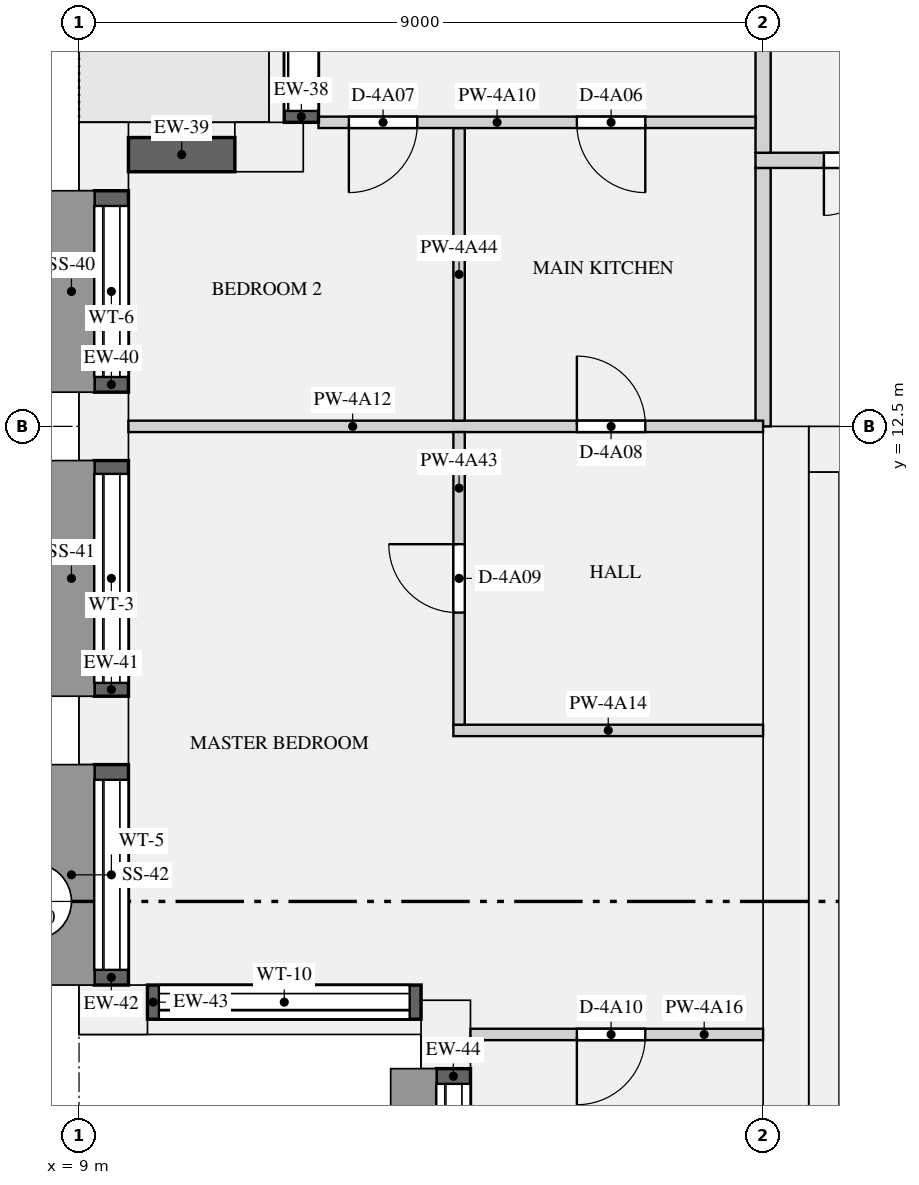
"""IFC4 building model, lengths in metres.
Left out: names, types, materials, properties, quantities, classifications, styles, units other than length and angle.
Written with IfcOpenShell. Run it as: python <this file> out.ifc"""

import sys

from ifc_helpers import new_model, si_unit, direction, frame, frame_2d, origin, origin_2d, place, context, subcontext, project, spatial, rectangle, extrude, element, fill, save


model = new_model("IFC4")
c1 = context("Model", 3, precision=1e-05, world=origin(), true_north=direction((0.0, 1.0)))
c2 = subcontext(c1, "Body", "Model", "MODEL_VIEW")
j1 = project(units=[si_unit("LENGTHUNIT", "METRE"), si_unit("PLANEANGLEUNIT", "RADIAN")], contexts=[c1])
p1 = place(None, origin())
s1 = spatial("IfcSite", under=j1, at=p1, CompositionType="ELEMENT")
p2 = place(p1, origin())
s2 = spatial("IfcBuilding", under=s1, at=p2, CompositionType="ELEMENT")
p3 = place(p2, frame((0.0, 0.0, 198.0)))
s3 = spatial("IfcBuildingStorey", under=s2, at=p3, CompositionType="ELEMENT", Elevation=198.0)
for number, where, z_axis, x_axis in (
    (1, (11.5, 16.175, 0.0), (0.0, 0.0, 1.0), (-1.0, 0.0, 0.0)),
    (2, (9.325, 16.05, 0.0), (0.0, 0.0, 1.0), (0.0, -1.0, 0.0)),
    (3, (9.325, 12.5, 0.0), (0.0, 0.0, 1.0), (0.0, -1.0, 0.0)),
    (4, (9.325, 8.5, 0.0), (0.0, 0.0, 1.0), (0.0, -1.0, 0.0)),
    (5, (9.45, 4.825, 0.0), (0.0, 0.0, 1.0), (1.0, 0.0, 0.0)),
    (6, (13.825, 4.5, 0.0), (0.0, 0.0, 1.0), (0.0, -1.0, 0.0)),
):
    element("IfcColumn", number, at=place(p3, frame(where, z_axis=z_axis, x_axis=x_axis)), inside=s3, PredefinedType="USERDEFINED", context=c2, shape_type="SweptSolid", body=[
        extrude(rectangle(XDim=0.9, YDim=0.65, at=origin_2d()), origin(), (0.0, 0.0, 1.0), 3.15),
    ])
p4 = place(p3, frame((18.3, 0.0, 0.0), z_axis=(0.0, 0.0, 1.0), x_axis=(0.0, 1.0, 0.0)))
e7 = element("IfcWall", 7, at=p4, inside=s3, PredefinedType="SHEAR", context=c2, shape_type="SweptSolid", body=[
    extrude(rectangle(XDim=12.5, YDim=0.6, at=frame_2d((6.25, 0.0))), origin(), (0.0, 0.0, 1.0), 3.15),
])
p5 = place(p3, frame((18.6, 12.2, 0.0), z_axis=(0.0, 0.0, 1.0), x_axis=(1.0, 0.0, 0.0)))
e8 = element("IfcWall", 8, at=p5, inside=s3, PredefinedType="SHEAR", context=c2, shape_type="SweptSolid", body=[
    extrude(rectangle(XDim=34.8, YDim=0.6, at=frame_2d((17.4, 0.0))), origin(), (0.0, 0.0, 1.0), 3.15),
])
p6 = place(p5, frame((24.575, 0.0, 0.0)))
e9 = element("IfcOpeningElement", 9, at=p6, cuts=e8, PredefinedType="OPENING", context=c2, shape_type="SweptSolid", body=[
    extrude(rectangle(XDim=1.1, YDim=2.1, at=frame_2d((0.55, 1.05))), frame((0.0, 0.31, 0.0), z_axis=(0.0, -1.0, 0.0), x_axis=(1.0, 0.0, 0.0)), (0.0, 0.0, 1.0), 0.62),
])
p7 = place(p5, frame((26.825, 0.0, 0.0)))
e10 = element("IfcOpeningElement", 10, at=p7, cuts=e8, PredefinedType="OPENING", context=c2, shape_type="SweptSolid", body=[
    extrude(rectangle(XDim=1.1, YDim=2.1, at=frame_2d((0.55, 1.05))), frame((0.0, 0.31, 0.0), z_axis=(0.0, -1.0, 0.0), x_axis=(1.0, 0.0, 0.0)), (0.0, 0.0, 1.0), 0.62),
])
p8 = place(p5, frame((29.075, 0.0, 0.0)))
e11 = element("IfcOpeningElement", 11, at=p8, cuts=e8, PredefinedType="OPENING", context=c2, shape_type="SweptSolid", body=[
    extrude(rectangle(XDim=1.1, YDim=2.1, at=frame_2d((0.55, 1.05))), frame((0.0, 0.31, 0.0), z_axis=(0.0, -1.0, 0.0), x_axis=(1.0, 0.0, 0.0)), (0.0, 0.0, 1.0), 0.62),
])
p9 = place(p5, frame((4.95, 0.0, 0.0)))
e12 = element("IfcOpeningElement", 12, at=p9, cuts=e8, PredefinedType="OPENING", context=c2, shape_type="SweptSolid", body=[
    extrude(rectangle(XDim=0.9, YDim=2.1, at=frame_2d((0.45, 1.05))), frame((0.0, 0.31, 0.0), z_axis=(0.0, -1.0, 0.0), x_axis=(1.0, 0.0, 0.0)), (0.0, 0.0, 1.0), 0.62),
])
p10 = place(p5, frame((18.45, 0.0, 0.0)))
e13 = element("IfcOpeningElement", 13, at=p10, cuts=e8, PredefinedType="OPENING", context=c2, shape_type="SweptSolid", body=[
    extrude(rectangle(XDim=0.9, YDim=2.1, at=frame_2d((0.45, 1.05))), frame((0.0, 0.31, 0.0), z_axis=(0.0, -1.0, 0.0), x_axis=(1.0, 0.0, 0.0)), (0.0, 0.0, 1.0), 0.62),
])
p11 = place(p5, frame((1.55, 0.0, 0.0)))
e14 = element("IfcOpeningElement", 14, at=p11, cuts=e8, PredefinedType="OPENING", context=c2, shape_type="SweptSolid", body=[
    extrude(rectangle(XDim=1.2, YDim=2.1, at=frame_2d((0.6, 1.05))), frame((0.0, 0.31, 0.0), z_axis=(0.0, -1.0, 0.0), x_axis=(1.0, 0.0, 0.0)), (0.0, 0.0, 1.0), 0.62),
])
p12 = place(p5, frame((32.05, 0.0, 0.0)))
e15 = element("IfcOpeningElement", 15, at=p12, cuts=e8, PredefinedType="OPENING", context=c2, shape_type="SweptSolid", body=[
    extrude(rectangle(XDim=1.2, YDim=2.1, at=frame_2d((0.6, 1.05))), frame((0.0, 0.31, 0.0), z_axis=(0.0, -1.0, 0.0), x_axis=(1.0, 0.0, 0.0)), (0.0, 0.0, 1.0), 0.62),
])
p13 = place(p3, frame((18.8, 1.0, 0.0), z_axis=(0.0, 0.0, 1.0), x_axis=(0.0, 1.0, 0.0)))
e16 = element("IfcWall", 16, at=p13, inside=s3, PredefinedType="SHEAR", context=c2, shape_type="SweptSolid", body=[
    extrude(rectangle(XDim=10.9, YDim=0.4, at=frame_2d((5.45, 0.0))), origin(), (0.0, 0.0, 1.0), 3.15),
])
p14 = place(p3, frame((11.925, 20.05, 0.0), z_axis=(0.0, 0.0, 1.0), x_axis=(0.0, -1.0, 0.0)))
e17 = element("IfcWall", 17, at=p14, inside=s3, PredefinedType="SOLIDWALL", context=c2, shape_type="SweptSolid", body=[
    extrude(rectangle(XDim=3.55, YDim=0.45, at=frame_2d((1.775, 0.0))), origin(), (0.0, 0.0, 1.0), 2.83),
])
p15 = place(p14, frame((0.15, 0.0, 0.0)))
e18 = element("IfcOpeningElement", 18, at=p15, cuts=e17, PredefinedType="OPENING", context=c2, shape_type="SweptSolid", body=[
    extrude(rectangle(XDim=3.25, YDim=2.3, at=frame_2d((1.625, 1.15))), frame((0.0, 0.235, 0.0), z_axis=(0.0, -1.0, 0.0), x_axis=(1.0, 0.0, 0.0)), (0.0, 0.0, 1.0), 0.47),
])
p16 = place(p3, frame((11.05, 16.075, 0.9), z_axis=(0.0, 0.0, 1.0), x_axis=(-1.0, 0.0, 0.0)))
e19 = element("IfcWall", 19, at=p16, inside=s3, PredefinedType="SOLIDWALL", context=c2, shape_type="SweptSolid", body=[
    extrude(rectangle(XDim=1.4, YDim=0.45, at=frame_2d((0.7, 0.0))), origin(), (0.0, 0.0, 1.0), 1.93),
])
p17 = place(p3, frame((9.425, 15.6, 0.9), z_axis=(0.0, 0.0, 1.0), x_axis=(0.0, -1.0, 0.0)))
e20 = element("IfcWall", 20, at=p17, inside=s3, PredefinedType="SOLIDWALL", context=c2, shape_type="SweptSolid", body=[
    extrude(rectangle(XDim=2.65, YDim=0.45, at=frame_2d((1.325, 0.0))), origin(), (0.0, 0.0, 1.0), 1.93),
])
p18 = place(p17, frame((0.2, 0.0, 0.15)))
e21 = element("IfcOpeningElement", 21, at=p18, cuts=e20, PredefinedType="OPENING", context=c2, shape_type="SweptSolid", body=[
    extrude(rectangle(XDim=2.25, YDim=1.5, at=frame_2d((1.125, 0.75))), frame((0.0, 0.235, 0.0), z_axis=(0.0, -1.0, 0.0), x_axis=(1.0, 0.0, 0.0)), (0.0, 0.0, 1.0), 0.47),
])
p19 = place(p3, frame((9.425, 12.05, 0.9), z_axis=(0.0, 0.0, 1.0), x_axis=(0.0, -1.0, 0.0)))
e22 = element("IfcWall", 22, at=p19, inside=s3, PredefinedType="SOLIDWALL", context=c2, shape_type="SweptSolid", body=[
    extrude(rectangle(XDim=3.1, YDim=0.45, at=frame_2d((1.55, 0.0))), origin(), (0.0, 0.0, 1.0), 1.93),
])
p20 = place(p19, frame((0.175, 0.0, 0.15)))
e23 = element("IfcOpeningElement", 23, at=p20, cuts=e22, PredefinedType="OPENING", context=c2, shape_type="SweptSolid", body=[
    extrude(rectangle(XDim=2.75, YDim=1.5, at=frame_2d((1.375, 0.75))), frame((0.0, 0.235, 0.0), z_axis=(0.0, -1.0, 0.0), x_axis=(1.0, 0.0, 0.0)), (0.0, 0.0, 1.0), 0.47),
])
p21 = place(p3, frame((9.425, 8.05, 0.9), z_axis=(0.0, 0.0, 1.0), x_axis=(0.0, -1.0, 0.0)))
e24 = element("IfcWall", 24, at=p21, inside=s3, PredefinedType="SOLIDWALL", context=c2, shape_type="SweptSolid", body=[
    extrude(rectangle(XDim=2.9, YDim=0.45, at=frame_2d((1.45, 0.0))), origin(), (0.0, 0.0, 1.0), 1.93),
])
p22 = place(p21, frame((0.2, 0.0, 0.15)))
e25 = element("IfcOpeningElement", 25, at=p22, cuts=e24, PredefinedType="OPENING", context=c2, shape_type="SweptSolid", body=[
    extrude(rectangle(XDim=2.5, YDim=1.5, at=frame_2d((1.25, 0.75))), frame((0.0, 0.235, 0.0), z_axis=(0.0, -1.0, 0.0), x_axis=(1.0, 0.0, 0.0)), (0.0, 0.0, 1.0), 0.47),
])
p23 = place(p3, frame((9.9, 4.925, 0.9), z_axis=(0.0, 0.0, 1.0), x_axis=(1.0, 0.0, 0.0)))
e26 = element("IfcWall", 26, at=p23, inside=s3, PredefinedType="SOLIDWALL", context=c2, shape_type="SweptSolid", body=[
    extrude(rectangle(XDim=3.6, YDim=0.45, at=frame_2d((1.8, 0.0))), origin(), (0.0, 0.0, 1.0), 1.93),
])
p24 = place(p23, frame((0.15, 0.0, 0.15)))
e27 = element("IfcOpeningElement", 27, at=p24, cuts=e26, PredefinedType="OPENING", context=c2, shape_type="SweptSolid", body=[
    extrude(rectangle(XDim=3.3, YDim=1.5, at=frame_2d((1.65, 0.75))), frame((0.0, 0.235, 0.0), z_axis=(0.0, -1.0, 0.0), x_axis=(1.0, 0.0, 0.0)), (0.0, 0.0, 1.0), 0.47),
])
p25 = place(p3, frame((13.925, 4.05, 0.9), z_axis=(0.0, 0.0, 1.0), x_axis=(0.0, -1.0, 0.0)))
e28 = element("IfcWall", 28, at=p25, inside=s3, PredefinedType="SOLIDWALL", context=c2, shape_type="SweptSolid", body=[
    extrude(rectangle(XDim=3.4, YDim=0.45, at=frame_2d((1.7, 0.0))), origin(), (0.0, 0.0, 1.0), 1.93),
])
p26 = place(p25, frame((0.2, 0.0, 0.15)))
e29 = element("IfcOpeningElement", 29, at=p26, cuts=e28, PredefinedType="OPENING", context=c2, shape_type="SweptSolid", body=[
    extrude(rectangle(XDim=3.0, YDim=1.5, at=frame_2d((1.5, 0.75))), frame((0.0, 0.235, 0.0), z_axis=(0.0, -1.0, 0.0), x_axis=(1.0, 0.0, 0.0)), (0.0, 0.0, 1.0), 0.47),
])
p27 = place(p3, frame((18.0, 12.5, 0.0), z_axis=(0.0, 0.0, 1.0), x_axis=(0.0, 1.0, 0.0)))
e30 = element("IfcWall", 30, at=p27, inside=s3, PredefinedType="PARTITIONING", context=c2, shape_type="SweptSolid", body=[
    extrude(rectangle(XDim=3.4, YDim=0.2, at=frame_2d((1.7, 0.0))), origin(), (0.0, 0.0, 1.0), 2.83),
])
p28 = place(p3, frame((12.15, 16.5, 0.0), z_axis=(0.0, 0.0, 1.0), x_axis=(1.0, 0.0, 0.0)))
e31 = element("IfcWall", 31, at=p28, inside=s3, PredefinedType="PARTITIONING", context=c2, shape_type="SweptSolid", body=[
    extrude(rectangle(XDim=5.75, YDim=0.15, at=frame_2d((2.875, 0.0))), origin(), (0.0, 0.0, 1.0), 2.83),
])
p29 = place(p28, frame((3.4, 0.0, 0.0)))
e32 = element("IfcOpeningElement", 32, at=p29, cuts=e31, PredefinedType="OPENING", context=c2, shape_type="SweptSolid", body=[
    extrude(rectangle(XDim=0.9, YDim=2.1, at=frame_2d((0.45, 1.05))), frame((0.0, 0.085, 0.0), z_axis=(0.0, -1.0, 0.0), x_axis=(1.0, 0.0, 0.0)), (0.0, 0.0, 1.0), 0.17),
])
p30 = place(p28, frame((0.4, 0.0, 0.0)))
e33 = element("IfcOpeningElement", 33, at=p30, cuts=e31, PredefinedType="OPENING", context=c2, shape_type="SweptSolid", body=[
    extrude(rectangle(XDim=0.9, YDim=2.1, at=frame_2d((0.45, 1.05))), frame((0.0, 0.085, 0.0), z_axis=(0.0, -1.0, 0.0), x_axis=(1.0, 0.0, 0.0)), (0.0, 0.0, 1.0), 0.17),
])
p31 = place(p3, frame((9.65, 12.5, 0.0), z_axis=(0.0, 0.0, 1.0), x_axis=(1.0, 0.0, 0.0)))
e34 = element("IfcWall", 34, at=p31, inside=s3, PredefinedType="PARTITIONING", context=c2, shape_type="SweptSolid", body=[
    extrude(rectangle(XDim=8.35, YDim=0.15, at=frame_2d((4.175, 0.0))), origin(), (0.0, 0.0, 1.0), 2.83),
])
p32 = place(p31, frame((5.9, 0.0, 0.0)))
e35 = element("IfcOpeningElement", 35, at=p32, cuts=e34, PredefinedType="OPENING", context=c2, shape_type="SweptSolid", body=[
    extrude(rectangle(XDim=0.9, YDim=2.1, at=frame_2d((0.45, 1.05))), frame((0.0, 0.085, 0.0), z_axis=(0.0, -1.0, 0.0), x_axis=(1.0, 0.0, 0.0)), (0.0, 0.0, 1.0), 0.17),
])
p33 = place(p3, frame((13.925, 8.5, 0.0), z_axis=(0.0, 0.0, 1.0), x_axis=(1.0, 0.0, 0.0)))
e36 = element("IfcWall", 36, at=p33, inside=s3, PredefinedType="PARTITIONING", context=c2, shape_type="SweptSolid", body=[
    extrude(rectangle(XDim=4.075, YDim=0.15, at=frame_2d((2.038, 0.0))), origin(), (0.0, 0.0, 1.0), 2.83),
])
p34 = place(p3, frame((14.15, 4.5, 0.0), z_axis=(0.0, 0.0, 1.0), x_axis=(1.0, 0.0, 0.0)))
e37 = element("IfcWall", 37, at=p34, inside=s3, PredefinedType="PARTITIONING", context=c2, shape_type="SweptSolid", body=[
    extrude(rectangle(XDim=3.85, YDim=0.15, at=frame_2d((1.925, 0.0))), origin(), (0.0, 0.0, 1.0), 2.83),
])
p35 = place(p34, frame((1.4, 0.0, 0.0)))
e38 = element("IfcOpeningElement", 38, at=p35, cuts=e37, PredefinedType="OPENING", context=c2, shape_type="SweptSolid", body=[
    extrude(rectangle(XDim=0.9, YDim=2.1, at=frame_2d((0.45, 1.05))), frame((0.0, 0.085, 0.0), z_axis=(0.0, -1.0, 0.0), x_axis=(1.0, 0.0, 0.0)), (0.0, 0.0, 1.0), 0.17),
])
p36 = place(p3, frame((17.9, 16.0, 0.0), z_axis=(0.0, 0.0, 1.0), x_axis=(1.0, 0.0, 0.0)))
e39 = element("IfcWall", 39, at=p36, inside=s3, PredefinedType="PARTITIONING", context=c2, shape_type="SweptSolid", body=[
    extrude(rectangle(XDim=36.2, YDim=0.2, at=frame_2d((18.1, 0.0))), origin(), (0.0, 0.0, 1.0), 2.83),
])
p37 = place(p36, frame((0.9, 0.0, 0.0)))
e40 = element("IfcOpeningElement", 40, at=p37, cuts=e39, PredefinedType="OPENING", context=c2, shape_type="SweptSolid", body=[
    extrude(rectangle(XDim=1.4, YDim=2.1, at=frame_2d((0.7, 1.05))), frame((0.0, 0.11, 0.0), z_axis=(0.0, -1.0, 0.0), x_axis=(1.0, 0.0, 0.0)), (0.0, 0.0, 1.0), 0.22),
])
p38 = place(p36, frame((33.9, 0.0, 0.0)))
e41 = element("IfcOpeningElement", 41, at=p38, cuts=e39, PredefinedType="OPENING", context=c2, shape_type="SweptSolid", body=[
    extrude(rectangle(XDim=1.4, YDim=2.1, at=frame_2d((0.7, 1.05))), frame((0.0, 0.11, 0.0), z_axis=(0.0, -1.0, 0.0), x_axis=(1.0, 0.0, 0.0)), (0.0, 0.0, 1.0), 0.22),
])
p39 = place(p3, frame((18.0, 16.1, 0.0), z_axis=(0.0, 0.0, 1.0), x_axis=(0.0, 1.0, 0.0)))
e42 = element("IfcWall", 42, at=p39, inside=s3, PredefinedType="PARTITIONING", context=c2, shape_type="SweptSolid", body=[
    extrude(rectangle(XDim=7.8, YDim=0.2, at=frame_2d((3.9, 0.0))), origin(), (0.0, 0.0, 1.0), 2.83),
])
p40 = place(p39, frame((5.35, 0.0, 0.0)))
e43 = element("IfcOpeningElement", 43, at=p40, cuts=e42, PredefinedType="OPENING", context=c2, shape_type="SweptSolid", body=[
    extrude(rectangle(XDim=1.1, YDim=2.1, at=frame_2d((0.55, 1.05))), frame((0.0, 0.11, 0.0), z_axis=(0.0, -1.0, 0.0), x_axis=(1.0, 0.0, 0.0)), (0.0, 0.0, 1.0), 0.22),
])
p41 = place(p3, frame((14.0, 8.575, 0.0), z_axis=(0.0, 0.0, 1.0), x_axis=(0.0, 1.0, 0.0)))
e44 = element("IfcWall", 44, at=p41, inside=s3, PredefinedType="PARTITIONING", context=c2, shape_type="SweptSolid", body=[
    extrude(rectangle(XDim=3.85, YDim=0.15, at=frame_2d((1.925, 0.0))), origin(), (0.0, 0.0, 1.0), 2.83),
])
p42 = place(p41, frame((1.475, 0.0, 0.0)))
e45 = element("IfcOpeningElement", 45, at=p42, cuts=e44, PredefinedType="OPENING", context=c2, shape_type="SweptSolid", body=[
    extrude(rectangle(XDim=0.9, YDim=2.1, at=frame_2d((0.45, 1.05))), frame((0.0, 0.085, 0.0), z_axis=(0.0, -1.0, 0.0), x_axis=(1.0, 0.0, 0.0)), (0.0, 0.0, 1.0), 0.17),
])
p43 = place(p3, frame((14.0, 12.575, 0.0), z_axis=(0.0, 0.0, 1.0), x_axis=(0.0, 1.0, 0.0)))
e46 = element("IfcWall", 46, at=p43, inside=s3, PredefinedType="PARTITIONING", context=c2, shape_type="SweptSolid", body=[
    extrude(rectangle(XDim=3.85, YDim=0.15, at=frame_2d((1.925, 0.0))), origin(), (0.0, 0.0, 1.0), 2.83),
])
p44 = place(p15, origin())
e47 = element("IfcDoor", 47, at=p44, inside=s3, OperationType="SLIDING_TO_LEFT", PredefinedType="DOOR", context=c2, shape_type="SweptSolid", body=[
    extrude(rectangle(XDim=3.25, YDim=2.3, at=frame_2d((1.625, 1.15))), frame((0.0, -0.07, 0.0), z_axis=(0.0, -1.0, 0.0), x_axis=(1.0, 0.0, 0.0)), (0.0, 0.0, 1.0), 0.05),
])
fill(e18, e47)
p45 = place(p18, origin())
e48 = element("IfcWindow", 48, at=p45, inside=s3, PartitioningType="SINGLE_PANEL", PredefinedType="WINDOW", context=c2, shape_type="SweptSolid", body=[
    extrude(rectangle(XDim=2.25, YDim=1.5, at=frame_2d((1.125, 0.75))), frame((0.0, -0.065, 0.0), z_axis=(0.0, -1.0, 0.0), x_axis=(1.0, 0.0, 0.0)), (0.0, 0.0, 1.0), 0.06),
])
fill(e21, e48)
p46 = place(p20, origin())
e49 = element("IfcWindow", 49, at=p46, inside=s3, PartitioningType="SINGLE_PANEL", PredefinedType="WINDOW", context=c2, shape_type="SweptSolid", body=[
    extrude(rectangle(XDim=2.75, YDim=1.5, at=frame_2d((1.375, 0.75))), frame((0.0, -0.065, 0.0), z_axis=(0.0, -1.0, 0.0), x_axis=(1.0, 0.0, 0.0)), (0.0, 0.0, 1.0), 0.06),
])
fill(e23, e49)
p47 = place(p22, origin())
e50 = element("IfcWindow", 50, at=p47, inside=s3, PartitioningType="SINGLE_PANEL", PredefinedType="WINDOW", context=c2, shape_type="SweptSolid", body=[
    extrude(rectangle(XDim=2.5, YDim=1.5, at=frame_2d((1.25, 0.75))), frame((0.0, -0.065, 0.0), z_axis=(0.0, -1.0, 0.0), x_axis=(1.0, 0.0, 0.0)), (0.0, 0.0, 1.0), 0.06),
])
fill(e25, e50)
p48 = place(p24, origin())
e51 = element("IfcWindow", 51, at=p48, inside=s3, PartitioningType="SINGLE_PANEL", PredefinedType="WINDOW", context=c2, shape_type="SweptSolid", body=[
    extrude(rectangle(XDim=3.3, YDim=1.5, at=frame_2d((1.65, 0.75))), frame((0.0, -0.065, 0.0), z_axis=(0.0, -1.0, 0.0), x_axis=(1.0, 0.0, 0.0)), (0.0, 0.0, 1.0), 0.06),
])
fill(e27, e51)
p49 = place(p26, origin())
e52 = element("IfcWindow", 52, at=p49, inside=s3, PartitioningType="SINGLE_PANEL", PredefinedType="WINDOW", context=c2, shape_type="SweptSolid", body=[
    extrude(rectangle(XDim=3.0, YDim=1.5, at=frame_2d((1.5, 0.75))), frame((0.0, -0.065, 0.0), z_axis=(0.0, -1.0, 0.0), x_axis=(1.0, 0.0, 0.0)), (0.0, 0.0, 1.0), 0.06),
])
fill(e29, e52)
p50 = place(p37, frame((1.4, 0.0, 0.0), z_axis=(0.0, 0.0, 1.0), x_axis=(-1.0, 0.0, 0.0)))
e53 = element("IfcDoor", 53, at=p50, inside=s3, OperationType="DOUBLE_DOOR_SINGLE_SWING", PredefinedType="DOOR", context=c2, shape_type="SweptSolid", body=[
    extrude(rectangle(XDim=1.4, YDim=2.1, at=frame_2d((0.7, 1.05))), frame((0.0, 0.025, 0.0), z_axis=(0.0, -1.0, 0.0), x_axis=(1.0, 0.0, 0.0)), (0.0, 0.0, 1.0), 0.05),
])
fill(e40, e53)
p51 = place(p29, frame((0.9, 0.0, 0.0), z_axis=(0.0, 0.0, 1.0), x_axis=(-1.0, 0.0, 0.0)))
e54 = element("IfcDoor", 54, at=p51, inside=s3, OperationType="SINGLE_SWING_LEFT", PredefinedType="DOOR", context=c2, shape_type="SweptSolid", body=[
    extrude(rectangle(XDim=0.9, YDim=2.1, at=frame_2d((0.45, 1.05))), frame((0.0, 0.025, 0.0), z_axis=(0.0, -1.0, 0.0), x_axis=(1.0, 0.0, 0.0)), (0.0, 0.0, 1.0), 0.05),
])
fill(e32, e54)
p52 = place(p30, frame((0.9, 0.0, 0.0), z_axis=(0.0, 0.0, 1.0), x_axis=(-1.0, 0.0, 0.0)))
e55 = element("IfcDoor", 55, at=p52, inside=s3, OperationType="SINGLE_SWING_RIGHT", PredefinedType="DOOR", context=c2, shape_type="SweptSolid", body=[
    extrude(rectangle(XDim=0.9, YDim=2.1, at=frame_2d((0.45, 1.05))), frame((0.0, 0.025, 0.0), z_axis=(0.0, -1.0, 0.0), x_axis=(1.0, 0.0, 0.0)), (0.0, 0.0, 1.0), 0.05),
])
fill(e33, e55)
p53 = place(p32, origin())
e56 = element("IfcDoor", 56, at=p53, inside=s3, OperationType="SINGLE_SWING_LEFT", PredefinedType="DOOR", context=c2, shape_type="SweptSolid", body=[
    extrude(rectangle(XDim=0.9, YDim=2.1, at=frame_2d((0.45, 1.05))), frame((0.0, 0.025, 0.0), z_axis=(0.0, -1.0, 0.0), x_axis=(1.0, 0.0, 0.0)), (0.0, 0.0, 1.0), 0.05),
])
fill(e35, e56)
p54 = place(p42, origin())
e57 = element("IfcDoor", 57, at=p54, inside=s3, OperationType="SINGLE_SWING_RIGHT", PredefinedType="DOOR", context=c2, shape_type="SweptSolid", body=[
    extrude(rectangle(XDim=0.9, YDim=2.1, at=frame_2d((0.45, 1.05))), frame((0.0, 0.025, 0.0), z_axis=(0.0, -1.0, 0.0), x_axis=(1.0, 0.0, 0.0)), (0.0, 0.0, 1.0), 0.05),
])
fill(e45, e57)
p55 = place(p35, frame((0.9, 0.0, 0.0), z_axis=(0.0, 0.0, 1.0), x_axis=(-1.0, 0.0, 0.0)))
e58 = element("IfcDoor", 58, at=p55, inside=s3, OperationType="SINGLE_SWING_RIGHT", PredefinedType="DOOR", context=c2, shape_type="SweptSolid", body=[
    extrude(rectangle(XDim=0.9, YDim=2.1, at=frame_2d((0.45, 1.05))), frame((0.0, 0.025, 0.0), z_axis=(0.0, -1.0, 0.0), x_axis=(1.0, 0.0, 0.0)), (0.0, 0.0, 1.0), 0.05),
])
fill(e38, e58)
save(model, sys.argv[1])
